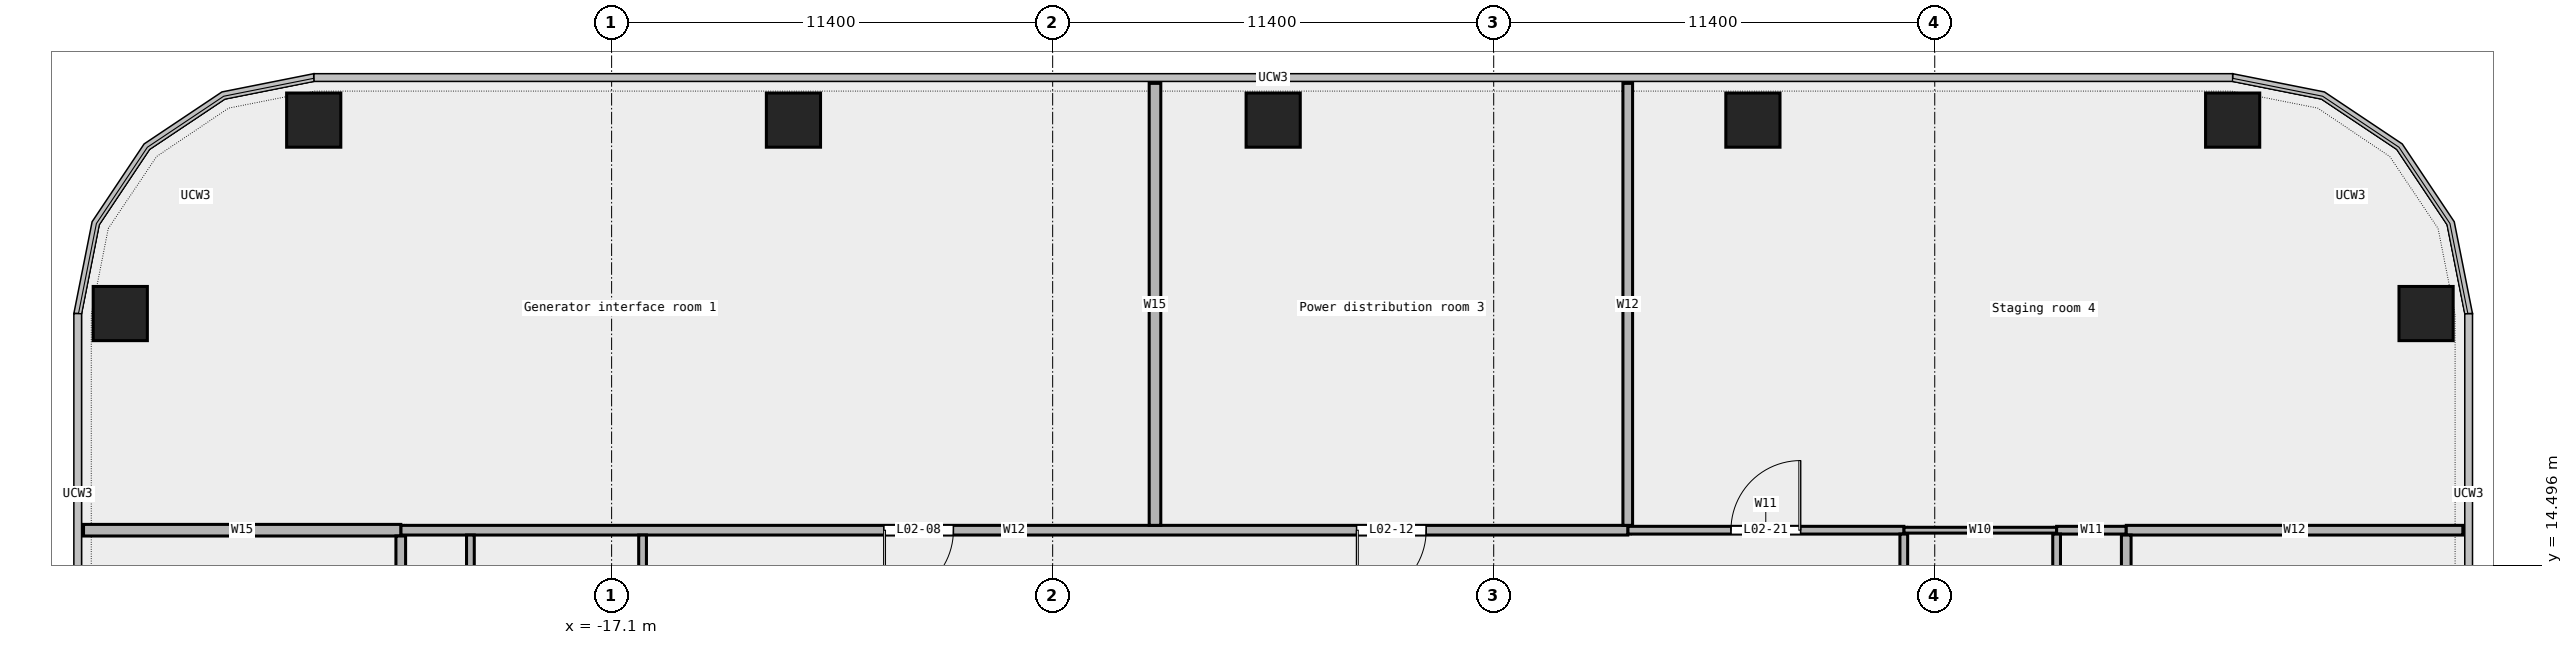
"""IFC4 building model, lengths in metres.
Left out: names, types, materials, properties, quantities, classifications, styles, units other than length and angle.
Written with IfcOpenShell. Run it as: python <this file> out.ifc"""

import sys

from ifc_helpers import new_model, si_unit, direction, frame, frame_2d, origin, origin_2d, place, context, subcontext, project, spatial, rectangle, extrude, element, fill, save


model = new_model("IFC4")
c1 = context("Model", 3, precision=1e-05, world=origin(), true_north=direction((0.0, 1.0)))
c2 = subcontext(c1, "Body", "Model", "MODEL_VIEW")
j1 = project(units=[si_unit("LENGTHUNIT", "METRE"), si_unit("PLANEANGLEUNIT", "RADIAN")], contexts=[c1])
p1 = place(None, origin())
s1 = spatial("IfcSite", under=j1, at=p1, CompositionType="ELEMENT")
p2 = place(p1, origin())
s2 = spatial("IfcBuilding", under=s1, at=p2, CompositionType="ELEMENT")
p3 = place(p2, frame((0.0, 0.0, 14.5)))
s3 = spatial("IfcBuildingStorey", under=s2, at=p3, CompositionType="ELEMENT", Elevation=14.5)
for number, where, z_axis, x_axis in (
    (1, (29.8, 21.0, 0.0), (0.0, 0.0, 1.0), (1.0, 0.0, 0.0)),
    (2, (24.8, 26.0, 0.0), (0.0, 0.0, 1.0), (1.0, 0.0, 0.0)),
    (3, (12.4, 26.0, 0.0), (0.0, 0.0, 1.0), (1.0, 0.0, 0.0)),
    (4, (0.0, 26.0, 0.0), (0.0, 0.0, 1.0), (1.0, 0.0, 0.0)),
    (5, (-12.4, 26.0, 0.0), (0.0, 0.0, 1.0), (1.0, 0.0, 0.0)),
    (6, (-24.8, 26.0, 0.0), (0.0, 0.0, 1.0), (1.0, 0.0, 0.0)),
    (7, (-29.8, 21.0, 0.0), (0.0, 0.0, 1.0), (1.0, 0.0, 0.0)),
):
    element("IfcColumn", number, at=place(p3, frame(where, z_axis=z_axis, x_axis=x_axis)), inside=s3, PredefinedType="COLUMN", context=c2, shape_type="SweptSolid", body=[
        extrude(rectangle(XDim=1.4, YDim=1.4, at=origin_2d()), origin(), (0.0, 0.0, 1.0), 5.0),
    ])
p4 = place(p3, frame((16.3, 15.4, 0.0), z_axis=(0.0, 0.0, 1.0), x_axis=(1.0, 0.0, 0.0)))
e8 = element("IfcWall", 8, at=p4, inside=s3, PredefinedType="PARTITIONING", context=c2, shape_type="SweptSolid", body=[
    extrude(rectangle(XDim=3.95, YDim=0.15, at=frame_2d((1.975, 0.0))), origin(), (0.0, 0.0, 1.0), 5.0),
])
p5 = place(p3, frame((9.165, 15.4, 0.0), z_axis=(0.0, 0.0, 1.0), x_axis=(1.0, 0.0, 0.0)))
e9 = element("IfcWall", 9, at=p5, inside=s3, PredefinedType="PARTITIONING", context=c2, shape_type="SweptSolid", body=[
    extrude(rectangle(XDim=7.135, YDim=0.2, at=frame_2d((3.567, 0.0))), origin(), (0.0, 0.0, 1.0), 5.0),
])
p6 = place(p5, frame((2.667, 0.0, 0.0)))
e10 = element("IfcOpeningElement", 10, at=p6, cuts=e9, PredefinedType="OPENING", context=c2, shape_type="SweptSolid", body=[
    extrude(rectangle(XDim=1.8, YDim=2.1, at=frame_2d((0.9, 1.05))), frame((0.0, 0.112, 0.0), z_axis=(0.0, -1.0, 0.0), x_axis=(1.0, 0.0, 0.0)), (0.0, 0.0, 1.0), 0.224),
])
p7 = place(p3, frame((20.25, 15.4, 0.0), z_axis=(0.0, 0.0, 1.0), x_axis=(1.0, 0.0, 0.0)))
e11 = element("IfcWall", 11, at=p7, inside=s3, PredefinedType="PARTITIONING", context=c2, shape_type="SweptSolid", body=[
    extrude(rectangle(XDim=1.8, YDim=0.2, at=frame_2d((0.9, 0.0))), origin(), (0.0, 0.0, 1.0), 5.0),
])
p8 = place(p3, frame((-22.55, 15.4, 0.0), z_axis=(0.0, 0.0, 1.0), x_axis=(1.0, 0.0, 0.0)))
e12 = element("IfcWall", 12, at=p8, inside=s3, PredefinedType="PARTITIONING", context=c2, shape_type="SweptSolid", body=[
    extrude(rectangle(XDim=31.715, YDim=0.25, at=frame_2d((15.857, 0.0))), origin(), (0.0, 0.0, 1.0), 5.0),
])
p9 = place(p8, frame((12.485, 0.0, 0.0)))
e13 = element("IfcOpeningElement", 13, at=p9, cuts=e12, PredefinedType="OPENING", context=c2, shape_type="SweptSolid", body=[
    extrude(rectangle(XDim=1.8, YDim=2.1, at=frame_2d((0.9, 1.05))), frame((0.0, 0.137, 0.0), z_axis=(0.0, -1.0, 0.0), x_axis=(1.0, 0.0, 0.0)), (0.0, 0.0, 1.0), 0.274),
])
p10 = place(p8, frame((24.705, 0.0, 0.0)))
e14 = element("IfcOpeningElement", 14, at=p10, cuts=e12, PredefinedType="OPENING", context=c2, shape_type="SweptSolid", body=[
    extrude(rectangle(XDim=1.8, YDim=2.1, at=frame_2d((0.9, 1.05))), frame((0.0, 0.137, 0.0), z_axis=(0.0, -1.0, 0.0), x_axis=(1.0, 0.0, 0.0)), (0.0, 0.0, 1.0), 0.274),
])
p11 = place(p3, frame((22.05, 15.4, 0.0), z_axis=(0.0, 0.0, 1.0), x_axis=(1.0, 0.0, 0.0)))
e15 = element("IfcWall", 15, at=p11, inside=s3, PredefinedType="PARTITIONING", context=c2, shape_type="SweptSolid", body=[
    extrude(rectangle(XDim=8.7, YDim=0.25, at=frame_2d((4.35, 0.0))), origin(), (0.0, 0.0, 1.0), 5.0),
])
p12 = place(p3, frame((-30.75, 15.4, 0.0), z_axis=(0.0, 0.0, 1.0), x_axis=(1.0, 0.0, 0.0)))
e16 = element("IfcWall", 16, at=p12, inside=s3, PredefinedType="PARTITIONING", context=c2, shape_type="SweptSolid", body=[
    extrude(rectangle(XDim=8.2, YDim=0.3, at=frame_2d((4.1, 0.0))), origin(), (0.0, 0.0, 1.0), 5.0),
])
p13 = place(p3, frame((-22.55, 11.79, 0.0), z_axis=(0.0, 0.0, 1.0), x_axis=(0.0, 1.0, 0.0)))
e17 = element("IfcWall", 17, at=p13, inside=s3, PredefinedType="PARTITIONING", context=c2, shape_type="SweptSolid", body=[
    extrude(rectangle(XDim=3.46, YDim=0.25, at=frame_2d((1.73, 0.0))), origin(), (0.0, 0.0, 1.0), 5.0),
])
p14 = place(p13, frame((1.28, 0.0, 0.0)))
e18 = element("IfcOpeningElement", 18, at=p14, cuts=e17, PredefinedType="OPENING", context=c2, shape_type="SweptSolid", body=[
    extrude(rectangle(XDim=0.9, YDim=2.1, at=frame_2d((0.45, 1.05))), frame((0.0, 0.137, 0.0), z_axis=(0.0, -1.0, 0.0), x_axis=(1.0, 0.0, 0.0)), (0.0, 0.0, 1.0), 0.274),
])
p15 = place(p3, frame((-20.75, 4.15, 0.0), z_axis=(0.0, 0.0, 1.0), x_axis=(0.0, 1.0, 0.0)))
e19 = element("IfcWall", 19, at=p15, inside=s3, PredefinedType="PARTITIONING", context=c2, shape_type="SweptSolid", body=[
    extrude(rectangle(XDim=11.125, YDim=0.2, at=frame_2d((5.562, 0.0))), origin(), (0.0, 0.0, 1.0), 5.0),
])
p16 = place(p3, frame((-16.3, 11.8, 0.0), z_axis=(0.0, 0.0, 1.0), x_axis=(0.0, 1.0, 0.0)))
e20 = element("IfcWall", 20, at=p16, inside=s3, PredefinedType="PARTITIONING", context=c2, shape_type="SweptSolid", body=[
    extrude(rectangle(XDim=3.475, YDim=0.2, at=frame_2d((1.737, 0.0))), origin(), (0.0, 0.0, 1.0), 5.0),
])
p17 = place(p16, frame((1.288, 0.0, 0.0)))
e21 = element("IfcOpeningElement", 21, at=p17, cuts=e20, PredefinedType="OPENING", context=c2, shape_type="SweptSolid", body=[
    extrude(rectangle(XDim=0.9, YDim=2.1, at=frame_2d((0.45, 1.05))), frame((0.0, 0.112, 0.0), z_axis=(0.0, -1.0, 0.0), x_axis=(1.0, 0.0, 0.0)), (0.0, 0.0, 1.0), 0.224),
])
p18 = place(p3, frame((-3.055, 15.525, 0.0), z_axis=(0.0, 0.0, 1.0), x_axis=(0.0, 1.0, 0.0)))
e22 = element("IfcWall", 22, at=p18, inside=s3, PredefinedType="PARTITIONING", context=c2, shape_type="SweptSolid", body=[
    extrude(rectangle(XDim=11.425, YDim=0.3, at=frame_2d((5.712, 0.0))), origin(), (0.0, 0.0, 1.0), 5.0),
])
p19 = place(p3, frame((9.165, 15.525, 0.0), z_axis=(0.0, 0.0, 1.0), x_axis=(0.0, 1.0, 0.0)))
e23 = element("IfcWall", 23, at=p19, inside=s3, PredefinedType="PARTITIONING", context=c2, shape_type="SweptSolid", body=[
    extrude(rectangle(XDim=11.425, YDim=0.25, at=frame_2d((5.712, 0.0))), origin(), (0.0, 0.0, 1.0), 5.0),
])
p20 = place(p3, frame((16.3, 11.8, 0.0), z_axis=(0.0, 0.0, 1.0), x_axis=(0.0, 1.0, 0.0)))
e24 = element("IfcWall", 24, at=p20, inside=s3, PredefinedType="PARTITIONING", context=c2, shape_type="SweptSolid", body=[
    extrude(rectangle(XDim=3.5, YDim=0.2, at=frame_2d((1.75, 0.0))), origin(), (0.0, 0.0, 1.0), 5.0),
])
p21 = place(p3, frame((20.25, 10.015, 0.0), z_axis=(0.0, 0.0, 1.0), x_axis=(0.0, 1.0, 0.0)))
e25 = element("IfcWall", 25, at=p21, inside=s3, PredefinedType="PARTITIONING", context=c2, shape_type="SweptSolid", body=[
    extrude(rectangle(XDim=5.285, YDim=0.2, at=frame_2d((2.643, 0.0))), origin(), (0.0, 0.0, 1.0), 5.0),
])
p22 = place(p21, frame((2.192, 0.0, 0.0)))
e26 = element("IfcOpeningElement", 26, at=p22, cuts=e25, PredefinedType="OPENING", context=c2, shape_type="SweptSolid", body=[
    extrude(rectangle(XDim=0.9, YDim=2.1, at=frame_2d((0.45, 1.05))), frame((0.0, 0.112, 0.0), z_axis=(0.0, -1.0, 0.0), x_axis=(1.0, 0.0, 0.0)), (0.0, 0.0, 1.0), 0.224),
])
p23 = place(p3, frame((22.05, 11.79, 0.0), z_axis=(0.0, 0.0, 1.0), x_axis=(0.0, 1.0, 0.0)))
e27 = element("IfcWall", 27, at=p23, inside=s3, PredefinedType="PARTITIONING", context=c2, shape_type="SweptSolid", body=[
    extrude(rectangle(XDim=3.485, YDim=0.25, at=frame_2d((1.742, 0.0))), origin(), (0.0, 0.0, 1.0), 5.0),
])
p24 = place(p23, frame((1.143, 0.0, 0.0)))
e28 = element("IfcOpeningElement", 28, at=p24, cuts=e27, PredefinedType="OPENING", context=c2, shape_type="SweptSolid", body=[
    extrude(rectangle(XDim=1.2, YDim=2.1, at=frame_2d((0.6, 1.05))), frame((0.0, 0.137, 0.0), z_axis=(0.0, -1.0, 0.0), x_axis=(1.0, 0.0, 0.0)), (0.0, 0.0, 1.0), 0.274),
])
p25 = place(p9, origin())
e29 = element("IfcDoor", 29, at=p25, inside=s3, OperationType="DOUBLE_DOOR_SINGLE_SWING", PredefinedType="DOOR", context=c2, shape_type="SweptSolid", body=[
    extrude(rectangle(XDim=1.8, YDim=2.1, at=frame_2d((0.9, 1.05))), frame((0.0, 0.025, 0.0), z_axis=(0.0, -1.0, 0.0), x_axis=(1.0, 0.0, 0.0)), (0.0, 0.0, 1.0), 0.05),
])
fill(e13, e29)
p26 = place(p10, origin())
e30 = element("IfcDoor", 30, at=p26, inside=s3, OperationType="DOUBLE_DOOR_SINGLE_SWING", PredefinedType="DOOR", context=c2, shape_type="SweptSolid", body=[
    extrude(rectangle(XDim=1.8, YDim=2.1, at=frame_2d((0.9, 1.05))), frame((0.0, 0.025, 0.0), z_axis=(0.0, -1.0, 0.0), x_axis=(1.0, 0.0, 0.0)), (0.0, 0.0, 1.0), 0.05),
])
fill(e14, e30)
p27 = place(p6, origin())
e31 = element("IfcDoor", 31, at=p27, inside=s3, OperationType="DOUBLE_DOOR_SINGLE_SWING", PredefinedType="DOOR", context=c2, shape_type="SweptSolid", body=[
    extrude(rectangle(XDim=1.8, YDim=2.1, at=frame_2d((0.9, 1.05))), frame((0.0, 0.025, 0.0), z_axis=(0.0, -1.0, 0.0), x_axis=(1.0, 0.0, 0.0)), (0.0, 0.0, 1.0), 0.05),
])
fill(e10, e31)
save(model, sys.argv[1])
